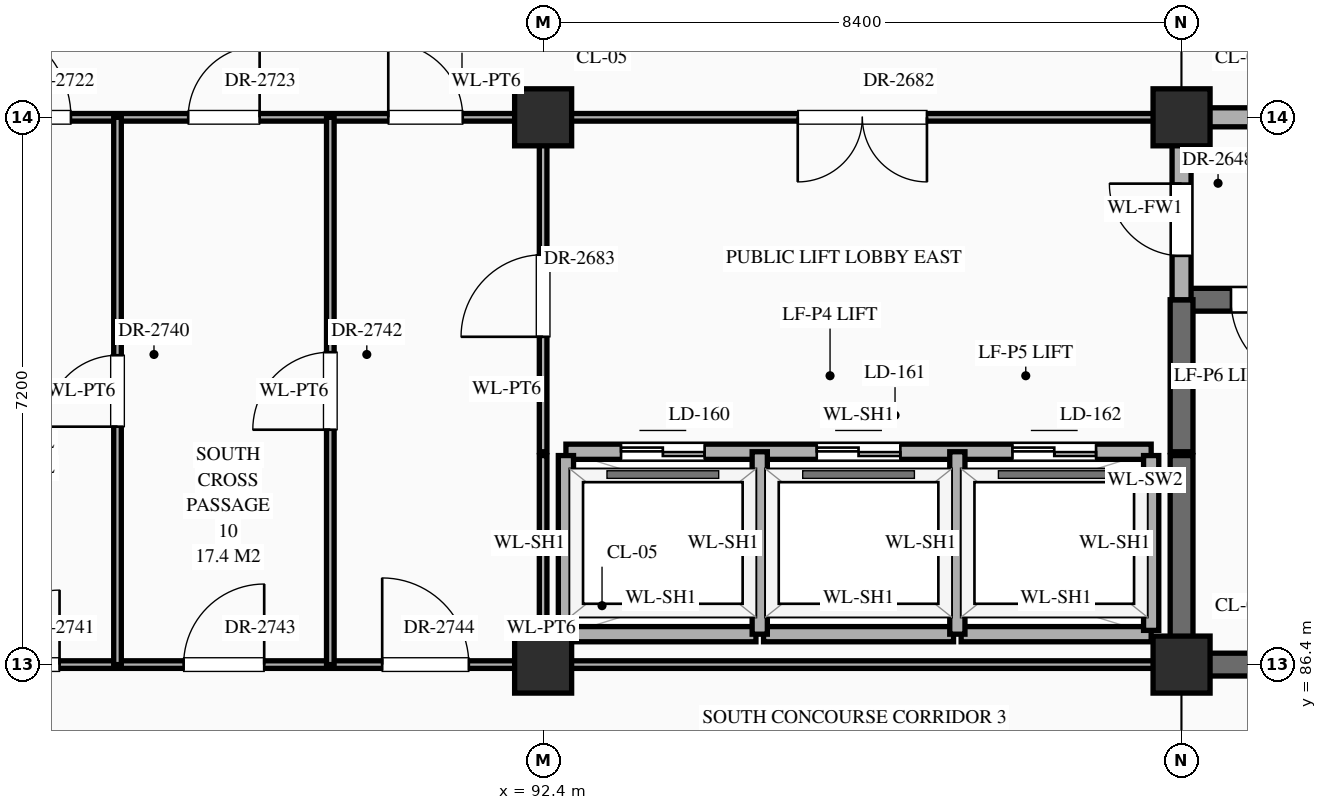
"""IFC4 building model, lengths in metres.
Left out: names, types, materials, properties, quantities, classifications, styles, units other than length and angle.
Written with IfcOpenShell. Run it as: python <this file> out.ifc"""

import sys

from ifc_helpers import new_model, si_unit, direction, frame, frame_2d, origin, origin_2d, place, context, subcontext, project, spatial, rectangle, extrude, element, fill, save


model = new_model("IFC4")
c1 = context("Model", 3, precision=1e-05, world=origin(), true_north=direction((0.0, 1.0)))
c2 = subcontext(c1, "Body", "Model", "MODEL_VIEW")
j1 = project(units=[si_unit("LENGTHUNIT", "METRE"), si_unit("PLANEANGLEUNIT", "RADIAN")], contexts=[c1])
p1 = place(None, origin())
s1 = spatial("IfcSite", under=j1, at=p1, CompositionType="ELEMENT")
p2 = place(p1, origin())
s2 = spatial("IfcBuilding", under=s1, at=p2, CompositionType="ELEMENT")
p3 = place(p2, frame((0.0, 0.0, 39.3)))
s3 = spatial("IfcBuildingStorey", under=s2, at=p3, CompositionType="ELEMENT", Elevation=39.3)
for number, where, z_axis, x_axis in (
    (1, (92.4, 86.4, 0.0), (0.0, 0.0, 1.0), (1.0, 0.0, 0.0)),
    (2, (92.4, 93.6, 0.0), (0.0, 0.0, 1.0), (1.0, 0.0, 0.0)),
    (3, (100.8, 86.4, 0.0), (0.0, 0.0, 1.0), (1.0, 0.0, 0.0)),
    (4, (100.8, 93.6, 0.0), (0.0, 0.0, 1.0), (1.0, 0.0, 0.0)),
):
    element("IfcColumn", number, at=place(p3, frame(where, z_axis=z_axis, x_axis=x_axis)), inside=s3, PredefinedType="COLUMN", context=c2, shape_type="SweptSolid", body=[
        extrude(rectangle(XDim=0.75, YDim=0.75, at=origin_2d()), origin(), (0.0, 0.0, 1.0), 4.2),
    ])
p4 = place(p3, frame((84.0, 86.4, 0.0), z_axis=(0.0, 0.0, 1.0), x_axis=(1.0, 0.0, 0.0)))
e5 = element("IfcWall", 5, at=p4, inside=s3, PredefinedType="STANDARD", context=c2, shape_type="SweptSolid", body=[
    extrude(rectangle(XDim=8.4, YDim=0.1, at=frame_2d((4.2, 0.0))), origin(), (0.0, 0.0, 1.0), 3.1),
])
p5 = place(p4, frame((1.058, 0.0, 0.0)))
e6 = element("IfcOpeningElement", 6, at=p5, cuts=e5, PredefinedType="OPENING", context=c2, shape_type="SweptSolid", body=[
    extrude(rectangle(XDim=0.98, YDim=2.35, at=frame_2d((0.49, 1.175))), frame((0.0, 0.062, 0.0), z_axis=(0.0, -1.0, 0.0), x_axis=(1.0, 0.0, 0.0)), (0.0, 0.0, 1.0), 0.124),
])
p6 = place(p4, frame((3.67, 0.0, 0.0)))
e7 = element("IfcOpeningElement", 7, at=p6, cuts=e5, PredefinedType="OPENING", context=c2, shape_type="SweptSolid", body=[
    extrude(rectangle(XDim=1.06, YDim=2.4, at=frame_2d((0.53, 1.2))), frame((0.0, 0.062, 0.0), z_axis=(0.0, -1.0, 0.0), x_axis=(1.0, 0.0, 0.0)), (0.0, 0.0, 1.0), 0.124),
])
p7 = place(p4, frame((6.282, 0.0, 0.0)))
e8 = element("IfcOpeningElement", 8, at=p7, cuts=e5, PredefinedType="OPENING", context=c2, shape_type="SweptSolid", body=[
    extrude(rectangle(XDim=1.14, YDim=2.4, at=frame_2d((0.57, 1.2))), frame((0.0, 0.062, 0.0), z_axis=(0.0, -1.0, 0.0), x_axis=(1.0, 0.0, 0.0)), (0.0, 0.0, 1.0), 0.124),
])
p8 = place(p3, frame((92.45, 86.4, 0.0), z_axis=(0.0, 0.0, 1.0), x_axis=(1.0, 0.0, 0.0)))
e9 = element("IfcWall", 9, at=p8, inside=s3, PredefinedType="STANDARD", context=c2, shape_type="SweptSolid", body=[
    extrude(rectangle(XDim=8.3, YDim=0.1, at=frame_2d((4.15, 0.0))), origin(), (0.0, 0.0, 1.0), 3.1),
])
p9 = place(p3, frame((100.8, 86.4, 0.0), z_axis=(0.0, 0.0, 1.0), x_axis=(1.0, 0.0, 0.0)))
e10 = element("IfcWall", 10, at=p9, inside=s3, PredefinedType="SHEAR", context=c2, shape_type="SweptSolid", body=[
    extrude(rectangle(XDim=8.4, YDim=0.3, at=frame_2d((4.2, 0.0))), origin(), (0.0, 0.0, 1.0), 3.95),
])
for number, where, z_axis, x_axis in (
    (11, (92.7, 86.8, 0.0), (0.0, 0.0, 1.0), (1.0, 0.0, 0.0)),
    (12, (95.3, 86.8, 0.0), (0.0, 0.0, 1.0), (1.0, 0.0, 0.0)),
    (13, (97.9, 86.8, 0.0), (0.0, 0.0, 1.0), (1.0, 0.0, 0.0)),
):
    element("IfcWall", number, at=place(p3, frame(where, z_axis=z_axis, x_axis=x_axis)), inside=s3, PredefinedType="STANDARD", context=c2, shape_type="SweptSolid", body=[
        extrude(rectangle(XDim=2.5, YDim=0.2, at=frame_2d((1.25, 0.0))), origin(), (0.0, 0.0, 1.0), 3.95),
    ])
p10 = place(p3, frame((92.7, 89.2, 0.0), z_axis=(0.0, 0.0, 1.0), x_axis=(1.0, 0.0, 0.0)))
e14 = element("IfcWall", 14, at=p10, inside=s3, PredefinedType="STANDARD", context=c2, shape_type="SweptSolid", body=[
    extrude(rectangle(XDim=7.7, YDim=0.2, at=frame_2d((3.85, 0.0))), origin(), (0.0, 0.0, 1.0), 3.95),
])
p11 = place(p10, frame((0.725, 0.0, 0.0)))
e15 = element("IfcOpeningElement", 15, at=p11, cuts=e14, PredefinedType="OPENING", context=c2, shape_type="SweptSolid", body=[
    extrude(rectangle(XDim=1.1, YDim=2.15, at=frame_2d((0.55, 1.075))), frame((0.0, 0.112, 0.0), z_axis=(0.0, -1.0, 0.0), x_axis=(1.0, 0.0, 0.0)), (0.0, 0.0, 1.0), 0.224),
])
p12 = place(p10, frame((3.3, 0.0, 0.0)))
e16 = element("IfcOpeningElement", 16, at=p12, cuts=e14, PredefinedType="OPENING", context=c2, shape_type="SweptSolid", body=[
    extrude(rectangle(XDim=1.1, YDim=2.15, at=frame_2d((0.55, 1.075))), frame((0.0, 0.112, 0.0), z_axis=(0.0, -1.0, 0.0), x_axis=(1.0, 0.0, 0.0)), (0.0, 0.0, 1.0), 0.224),
])
p13 = place(p10, frame((5.875, 0.0, 0.0)))
e17 = element("IfcOpeningElement", 17, at=p13, cuts=e14, PredefinedType="OPENING", context=c2, shape_type="SweptSolid", body=[
    extrude(rectangle(XDim=1.1, YDim=2.15, at=frame_2d((0.55, 1.075))), frame((0.0, 0.112, 0.0), z_axis=(0.0, -1.0, 0.0), x_axis=(1.0, 0.0, 0.0)), (0.0, 0.0, 1.0), 0.224),
])
p14 = place(p3, frame((100.8, 91.2, 0.0), z_axis=(0.0, 0.0, 1.0), x_axis=(1.0, 0.0, 0.0)))
e18 = element("IfcWall", 18, at=p14, inside=s3, PredefinedType="SHEAR", context=c2, shape_type="SweptSolid", body=[
    extrude(rectangle(XDim=8.4, YDim=0.3, at=frame_2d((4.2, 0.0))), origin(), (0.0, 0.0, 1.0), 3.95),
])
p15 = place(p14, frame((0.65, 0.0, 0.0)))
e19 = element("IfcOpeningElement", 19, at=p15, cuts=e18, PredefinedType="OPENING", context=c2, shape_type="SweptSolid", body=[
    extrude(rectangle(XDim=1.1, YDim=2.2, at=frame_2d((0.55, 1.1))), frame((0.0, 0.162, 0.0), z_axis=(0.0, -1.0, 0.0), x_axis=(1.0, 0.0, 0.0)), (0.0, 0.0, 1.0), 0.324),
])
p16 = place(p3, frame((67.2, 93.6, 0.0), z_axis=(0.0, 0.0, 1.0), x_axis=(1.0, 0.0, 0.0)))
e20 = element("IfcWall", 20, at=p16, inside=s3, PredefinedType="STANDARD", context=c2, shape_type="SweptSolid", body=[
    extrude(rectangle(XDim=33.6, YDim=0.1, at=frame_2d((16.8, 0.0))), origin(), (0.0, 0.0, 1.0), 3.1),
])
p17 = place(p16, frame((3.425, 0.0, 0.0)))
e21 = element("IfcOpeningElement", 21, at=p17, cuts=e20, PredefinedType="OPENING", context=c2, shape_type="SweptSolid", body=[
    extrude(rectangle(XDim=1.55, YDim=2.35, at=frame_2d((0.775, 1.175))), frame((0.0, 0.062, 0.0), z_axis=(0.0, -1.0, 0.0), x_axis=(1.0, 0.0, 0.0)), (0.0, 0.0, 1.0), 0.124),
])
p18 = place(p16, frame((28.55, 0.0, 0.0)))
e22 = element("IfcOpeningElement", 22, at=p18, cuts=e20, PredefinedType="OPENING", context=c2, shape_type="SweptSolid", body=[
    extrude(rectangle(XDim=1.7, YDim=2.45, at=frame_2d((0.85, 1.225))), frame((0.0, 0.062, 0.0), z_axis=(0.0, -1.0, 0.0), x_axis=(1.0, 0.0, 0.0)), (0.0, 0.0, 1.0), 0.124),
])
p19 = place(p16, frame((11.825, 0.0, 0.0)))
e23 = element("IfcOpeningElement", 23, at=p19, cuts=e20, PredefinedType="OPENING", context=c2, shape_type="SweptSolid", body=[
    extrude(rectangle(XDim=1.55, YDim=2.35, at=frame_2d((0.775, 1.175))), frame((0.0, 0.062, 0.0), z_axis=(0.0, -1.0, 0.0), x_axis=(1.0, 0.0, 0.0)), (0.0, 0.0, 1.0), 0.124),
])
p20 = place(p16, frame((17.708, 0.0, 0.0)))
e24 = element("IfcOpeningElement", 24, at=p20, cuts=e20, PredefinedType="OPENING", context=c2, shape_type="SweptSolid", body=[
    extrude(rectangle(XDim=1.28, YDim=2.35, at=frame_2d((0.64, 1.175))), frame((0.0, 0.062, 0.0), z_axis=(0.0, -1.0, 0.0), x_axis=(1.0, 0.0, 0.0)), (0.0, 0.0, 1.0), 0.124),
])
p21 = place(p16, frame((20.53, 0.0, 0.0)))
e25 = element("IfcOpeningElement", 25, at=p21, cuts=e20, PredefinedType="OPENING", context=c2, shape_type="SweptSolid", body=[
    extrude(rectangle(XDim=0.94, YDim=2.3, at=frame_2d((0.47, 1.15))), frame((0.0, 0.062, 0.0), z_axis=(0.0, -1.0, 0.0), x_axis=(1.0, 0.0, 0.0)), (0.0, 0.0, 1.0), 0.124),
])
p22 = place(p16, frame((23.163, 0.0, 0.0)))
e26 = element("IfcOpeningElement", 26, at=p22, cuts=e20, PredefinedType="OPENING", context=c2, shape_type="SweptSolid", body=[
    extrude(rectangle(XDim=0.98, YDim=2.35, at=frame_2d((0.49, 1.175))), frame((0.0, 0.062, 0.0), z_axis=(0.0, -1.0, 0.0), x_axis=(1.0, 0.0, 0.0)), (0.0, 0.0, 1.0), 0.124),
])
p23 = place(p3, frame((100.8, 93.6, 0.0), z_axis=(0.0, 0.0, 1.0), x_axis=(1.0, 0.0, 0.0)))
e27 = element("IfcWall", 27, at=p23, inside=s3, PredefinedType="STANDARD", context=c2, shape_type="SweptSolid", body=[
    extrude(rectangle(XDim=8.4, YDim=0.25, at=frame_2d((4.2, 0.0))), origin(), (0.0, 0.0, 1.0), 3.1),
])
p24 = place(p23, frame((3.45, 0.0, 0.0)))
e28 = element("IfcOpeningElement", 28, at=p24, cuts=e27, PredefinedType="OPENING", context=c2, shape_type="SweptSolid", body=[
    extrude(rectangle(XDim=1.5, YDim=2.25, at=frame_2d((0.75, 1.125))), frame((0.0, 0.137, 0.0), z_axis=(0.0, -1.0, 0.0), x_axis=(1.0, 0.0, 0.0)), (0.0, 0.0, 1.0), 0.274),
])
p25 = place(p3, frame((86.8, 86.4, 0.0), z_axis=(0.0, 0.0, 1.0), x_axis=(0.0, 1.0, 0.0)))
e29 = element("IfcWall", 29, at=p25, inside=s3, PredefinedType="STANDARD", context=c2, shape_type="SweptSolid", body=[
    extrude(rectangle(XDim=7.2, YDim=0.1, at=frame_2d((3.6, 0.0))), origin(), (0.0, 0.0, 1.0), 3.95),
])
p26 = place(p25, frame((3.13, 0.0, 0.0)))
e30 = element("IfcOpeningElement", 30, at=p26, cuts=e29, PredefinedType="OPENING", context=c2, shape_type="SweptSolid", body=[
    extrude(rectangle(XDim=0.94, YDim=2.3, at=frame_2d((0.47, 1.15))), frame((0.0, 0.062, 0.0), z_axis=(0.0, -1.0, 0.0), x_axis=(1.0, 0.0, 0.0)), (0.0, 0.0, 1.0), 0.124),
])
p27 = place(p3, frame((89.6, 86.4, 0.0), z_axis=(0.0, 0.0, 1.0), x_axis=(0.0, 1.0, 0.0)))
e31 = element("IfcWall", 31, at=p27, inside=s3, PredefinedType="STANDARD", context=c2, shape_type="SweptSolid", body=[
    extrude(rectangle(XDim=7.2, YDim=0.1, at=frame_2d((3.6, 0.0))), origin(), (0.0, 0.0, 1.0), 3.95),
])
p28 = place(p27, frame((3.09, 0.0, 0.0)))
e32 = element("IfcOpeningElement", 32, at=p28, cuts=e31, PredefinedType="OPENING", context=c2, shape_type="SweptSolid", body=[
    extrude(rectangle(XDim=1.02, YDim=2.4, at=frame_2d((0.51, 1.2))), frame((0.0, 0.062, 0.0), z_axis=(0.0, -1.0, 0.0), x_axis=(1.0, 0.0, 0.0)), (0.0, 0.0, 1.0), 0.124),
])
p29 = place(p3, frame((92.4, 86.45, 0.0), z_axis=(0.0, 0.0, 1.0), x_axis=(0.0, 1.0, 0.0)))
e33 = element("IfcWall", 33, at=p29, inside=s3, PredefinedType="STANDARD", context=c2, shape_type="SweptSolid", body=[
    extrude(rectangle(XDim=2.7, YDim=0.1, at=frame_2d((1.35, 0.0))), origin(), (0.0, 0.0, 1.0), 3.2),
])
p30 = place(p3, frame((92.4, 89.2, 0.0), z_axis=(0.0, 0.0, 1.0), x_axis=(0.0, 1.0, 0.0)))
e34 = element("IfcWall", 34, at=p30, inside=s3, PredefinedType="STANDARD", context=c2, shape_type="SweptSolid", body=[
    extrude(rectangle(XDim=4.4, YDim=0.1, at=frame_2d((2.2, 0.0))), origin(), (0.0, 0.0, 1.0), 3.2),
])
p31 = place(p30, frame((1.512, 0.0, 0.0)))
e35 = element("IfcOpeningElement", 35, at=p31, cuts=e34, PredefinedType="OPENING", context=c2, shape_type="SweptSolid", body=[
    extrude(rectangle(XDim=1.08, YDim=2.25, at=frame_2d((0.54, 1.125))), frame((0.0, 0.062, 0.0), z_axis=(0.0, -1.0, 0.0), x_axis=(1.0, 0.0, 0.0)), (0.0, 0.0, 1.0), 0.124),
])
p32 = place(p3, frame((92.7, 86.85, 0.0), z_axis=(0.0, 0.0, 1.0), x_axis=(0.0, 1.0, 0.0)))
e36 = element("IfcWall", 36, at=p32, inside=s3, PredefinedType="STANDARD", context=c2, shape_type="SweptSolid", body=[
    extrude(rectangle(XDim=2.3, YDim=0.2, at=frame_2d((1.15, 0.0))), origin(), (0.0, 0.0, 1.0), 3.95),
])
for number, where, z_axis, x_axis in (
    (37, (95.25, 86.8, 0.0), (0.0, 0.0, 1.0), (0.0, 1.0, 0.0)),
    (38, (97.85, 86.8, 0.0), (0.0, 0.0, 1.0), (0.0, 1.0, 0.0)),
):
    element("IfcWall", number, at=place(p3, frame(where, z_axis=z_axis, x_axis=x_axis)), inside=s3, PredefinedType="STANDARD", context=c2, shape_type="SweptSolid", body=[
        extrude(rectangle(XDim=2.4, YDim=0.2, at=frame_2d((1.2, 0.0))), origin(), (0.0, 0.0, 1.0), 3.95),
    ])
p33 = place(p3, frame((100.4, 86.85, 0.0), z_axis=(0.0, 0.0, 1.0), x_axis=(0.0, 1.0, 0.0)))
e39 = element("IfcWall", 39, at=p33, inside=s3, PredefinedType="STANDARD", context=c2, shape_type="SweptSolid", body=[
    extrude(rectangle(XDim=2.3, YDim=0.2, at=frame_2d((1.15, 0.0))), origin(), (0.0, 0.0, 1.0), 3.95),
])
p34 = place(p3, frame((100.8, 86.45, 0.0), z_axis=(0.0, 0.0, 1.0), x_axis=(0.0, 1.0, 0.0)))
e40 = element("IfcWall", 40, at=p34, inside=s3, PredefinedType="SHEAR", context=c2, shape_type="SweptSolid", body=[
    extrude(rectangle(XDim=2.7, YDim=0.3, at=frame_2d((1.35, 0.0))), origin(), (0.0, 0.0, 1.0), 3.95),
])
p35 = place(p3, frame((100.8, 89.2, 0.0), z_axis=(0.0, 0.0, 1.0), x_axis=(0.0, 1.0, 0.0)))
e41 = element("IfcWall", 41, at=p35, inside=s3, PredefinedType="SHEAR", context=c2, shape_type="SweptSolid", body=[
    extrude(rectangle(XDim=2.0, YDim=0.3, at=frame_2d((1.0, 0.0))), origin(), (0.0, 0.0, 1.0), 3.95),
])
p36 = place(p3, frame((100.8, 91.2, 0.0), z_axis=(0.0, 0.0, 1.0), x_axis=(0.0, 1.0, 0.0)))
e42 = element("IfcWall", 42, at=p36, inside=s3, PredefinedType="STANDARD", context=c2, shape_type="SweptSolid", body=[
    extrude(rectangle(XDim=2.4, YDim=0.25, at=frame_2d((1.2, 0.0))), origin(), (0.0, 0.0, 1.0), 3.2),
])
p37 = place(p36, frame((0.577, 0.0, 0.0)))
e43 = element("IfcOpeningElement", 43, at=p37, cuts=e42, PredefinedType="OPENING", context=c2, shape_type="SweptSolid", body=[
    extrude(rectangle(XDim=0.95, YDim=2.15, at=frame_2d((0.475, 1.075))), frame((0.0, 0.137, 0.0), z_axis=(0.0, -1.0, 0.0), x_axis=(1.0, 0.0, 0.0)), (0.0, 0.0, 1.0), 0.274),
])
p38 = place(p11, origin())
e44 = element("IfcDoor", 44, at=p38, inside=s3, OperationType="DOUBLE_DOOR_SLIDING", PredefinedType="DOOR", context=c2, shape_type="SweptSolid", body=[
    extrude(rectangle(XDim=1.1, YDim=2.15, at=frame_2d((0.55, 1.075))), frame((0.0, 0.025, 0.0), z_axis=(0.0, -1.0, 0.0), x_axis=(1.0, 0.0, 0.0)), (0.0, 0.0, 1.0), 0.05),
])
fill(e15, e44)
p39 = place(p12, origin())
e45 = element("IfcDoor", 45, at=p39, inside=s3, OperationType="DOUBLE_DOOR_SLIDING", PredefinedType="DOOR", context=c2, shape_type="SweptSolid", body=[
    extrude(rectangle(XDim=1.1, YDim=2.15, at=frame_2d((0.55, 1.075))), frame((0.0, 0.025, 0.0), z_axis=(0.0, -1.0, 0.0), x_axis=(1.0, 0.0, 0.0)), (0.0, 0.0, 1.0), 0.05),
])
fill(e16, e45)
p40 = place(p13, origin())
e46 = element("IfcDoor", 46, at=p40, inside=s3, OperationType="DOUBLE_DOOR_SLIDING", PredefinedType="DOOR", context=c2, shape_type="SweptSolid", body=[
    extrude(rectangle(XDim=1.1, YDim=2.15, at=frame_2d((0.55, 1.075))), frame((0.0, 0.025, 0.0), z_axis=(0.0, -1.0, 0.0), x_axis=(1.0, 0.0, 0.0)), (0.0, 0.0, 1.0), 0.05),
])
fill(e17, e46)
p41 = place(p15, frame((1.1, 0.0, 0.0), z_axis=(0.0, 0.0, 1.0), x_axis=(-1.0, 0.0, 0.0)))
e47 = element("IfcDoor", 47, at=p41, inside=s3, OperationType="SINGLE_SWING_LEFT", PredefinedType="DOOR", context=c2, shape_type="SweptSolid", body=[
    extrude(rectangle(XDim=1.1, YDim=2.2, at=frame_2d((0.55, 1.1))), frame((0.0, 0.025, 0.0), z_axis=(0.0, -1.0, 0.0), x_axis=(1.0, 0.0, 0.0)), (0.0, 0.0, 1.0), 0.05),
])
fill(e19, e47)
p42 = place(p37, origin())
e48 = element("IfcDoor", 48, at=p42, inside=s3, OperationType="SINGLE_SWING_RIGHT", PredefinedType="DOOR", context=c2, shape_type="SweptSolid", body=[
    extrude(rectangle(XDim=0.95, YDim=2.15, at=frame_2d((0.475, 1.075))), frame((0.0, 0.025, 0.0), z_axis=(0.0, -1.0, 0.0), x_axis=(1.0, 0.0, 0.0)), (0.0, 0.0, 1.0), 0.05),
])
fill(e43, e48)
p43 = place(p18, frame((1.7, 0.0, 0.0), z_axis=(0.0, 0.0, 1.0), x_axis=(-1.0, 0.0, 0.0)))
e49 = element("IfcDoor", 49, at=p43, inside=s3, OperationType="DOUBLE_DOOR_SINGLE_SWING", PredefinedType="DOOR", context=c2, shape_type="SweptSolid", body=[
    extrude(rectangle(XDim=1.7, YDim=2.45, at=frame_2d((0.85, 1.225))), frame((0.0, 0.025, 0.0), z_axis=(0.0, -1.0, 0.0), x_axis=(1.0, 0.0, 0.0)), (0.0, 0.0, 1.0), 0.05),
])
fill(e22, e49)
p44 = place(p31, origin())
e50 = element("IfcDoor", 50, at=p44, inside=s3, OperationType="SINGLE_SWING_LEFT", PredefinedType="DOOR", context=c2, shape_type="SweptSolid", body=[
    extrude(rectangle(XDim=1.08, YDim=2.25, at=frame_2d((0.54, 1.125))), frame((0.0, 0.025, 0.0), z_axis=(0.0, -1.0, 0.0), x_axis=(1.0, 0.0, 0.0)), (0.0, 0.0, 1.0), 0.05),
])
fill(e35, e50)
p45 = place(p20, origin())
e51 = element("IfcDoor", 51, at=p45, inside=s3, OperationType="SINGLE_SWING_LEFT", PredefinedType="DOOR", context=c2, shape_type="SweptSolid", body=[
    extrude(rectangle(XDim=1.28, YDim=2.35, at=frame_2d((0.64, 1.175))), frame((0.0, 0.025, 0.0), z_axis=(0.0, -1.0, 0.0), x_axis=(1.0, 0.0, 0.0)), (0.0, 0.0, 1.0), 0.05),
])
fill(e24, e51)
p46 = place(p21, origin())
e52 = element("IfcDoor", 52, at=p46, inside=s3, OperationType="SINGLE_SWING_RIGHT", PredefinedType="DOOR", context=c2, shape_type="SweptSolid", body=[
    extrude(rectangle(XDim=0.94, YDim=2.3, at=frame_2d((0.47, 1.15))), frame((0.0, 0.025, 0.0), z_axis=(0.0, -1.0, 0.0), x_axis=(1.0, 0.0, 0.0)), (0.0, 0.0, 1.0), 0.05),
])
fill(e25, e52)
p47 = place(p22, origin())
e53 = element("IfcDoor", 53, at=p47, inside=s3, OperationType="SINGLE_SWING_LEFT", PredefinedType="DOOR", context=c2, shape_type="SweptSolid", body=[
    extrude(rectangle(XDim=0.98, YDim=2.35, at=frame_2d((0.49, 1.175))), frame((0.0, 0.025, 0.0), z_axis=(0.0, -1.0, 0.0), x_axis=(1.0, 0.0, 0.0)), (0.0, 0.0, 1.0), 0.05),
])
fill(e26, e53)
p48 = place(p26, origin())
e54 = element("IfcDoor", 54, at=p48, inside=s3, OperationType="SINGLE_SWING_LEFT", PredefinedType="DOOR", context=c2, shape_type="SweptSolid", body=[
    extrude(rectangle(XDim=0.94, YDim=2.3, at=frame_2d((0.47, 1.15))), frame((0.0, 0.025, 0.0), z_axis=(0.0, -1.0, 0.0), x_axis=(1.0, 0.0, 0.0)), (0.0, 0.0, 1.0), 0.05),
])
fill(e30, e54)
p49 = place(p5, origin())
e55 = element("IfcDoor", 55, at=p49, inside=s3, OperationType="SINGLE_SWING_RIGHT", PredefinedType="DOOR", context=c2, shape_type="SweptSolid", body=[
    extrude(rectangle(XDim=0.98, YDim=2.35, at=frame_2d((0.49, 1.175))), frame((0.0, 0.025, 0.0), z_axis=(0.0, -1.0, 0.0), x_axis=(1.0, 0.0, 0.0)), (0.0, 0.0, 1.0), 0.05),
])
fill(e6, e55)
p50 = place(p28, origin())
e56 = element("IfcDoor", 56, at=p50, inside=s3, OperationType="SINGLE_SWING_LEFT", PredefinedType="DOOR", context=c2, shape_type="SweptSolid", body=[
    extrude(rectangle(XDim=1.02, YDim=2.4, at=frame_2d((0.51, 1.2))), frame((0.0, 0.025, 0.0), z_axis=(0.0, -1.0, 0.0), x_axis=(1.0, 0.0, 0.0)), (0.0, 0.0, 1.0), 0.05),
])
fill(e32, e56)
p51 = place(p6, origin())
e57 = element("IfcDoor", 57, at=p51, inside=s3, OperationType="SINGLE_SWING_RIGHT", PredefinedType="DOOR", context=c2, shape_type="SweptSolid", body=[
    extrude(rectangle(XDim=1.06, YDim=2.4, at=frame_2d((0.53, 1.2))), frame((0.0, 0.025, 0.0), z_axis=(0.0, -1.0, 0.0), x_axis=(1.0, 0.0, 0.0)), (0.0, 0.0, 1.0), 0.05),
])
fill(e7, e57)
p52 = place(p7, origin())
e58 = element("IfcDoor", 58, at=p52, inside=s3, OperationType="SINGLE_SWING_LEFT", PredefinedType="DOOR", context=c2, shape_type="SweptSolid", body=[
    extrude(rectangle(XDim=1.14, YDim=2.4, at=frame_2d((0.57, 1.2))), frame((0.0, 0.025, 0.0), z_axis=(0.0, -1.0, 0.0), x_axis=(1.0, 0.0, 0.0)), (0.0, 0.0, 1.0), 0.05),
])
fill(e8, e58)
save(model, sys.argv[1])
